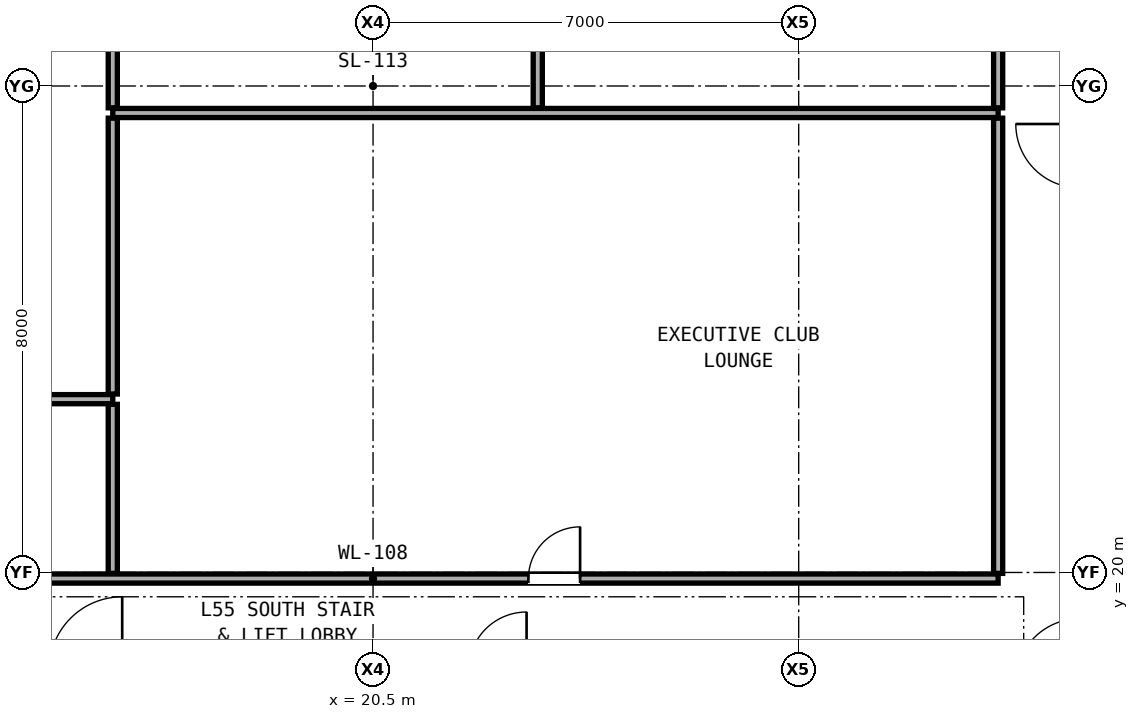
"""IFC4 building model, lengths in metres.
Left out: names, types, materials, properties, quantities, classifications, styles, units other than length and angle.
Written with IfcOpenShell. Run it as: python <this file> out.ifc"""

import sys

from ifc_helpers import new_model, si_unit, direction, frame, frame_2d, origin, place, context, subcontext, project, spatial, rectangle, extrude, element, fill, save


model = new_model("IFC4")
c1 = context("Model", 3, precision=1e-05, world=origin(), true_north=direction((0.0, 1.0)))
c2 = subcontext(c1, "Body", "Model", "MODEL_VIEW")
j1 = project(units=[si_unit("LENGTHUNIT", "METRE"), si_unit("PLANEANGLEUNIT", "RADIAN")], contexts=[c1])
p1 = place(None, origin())
s1 = spatial("IfcSite", under=j1, at=p1, CompositionType="ELEMENT")
p2 = place(p1, origin())
s2 = spatial("IfcBuilding", under=s1, at=p2, CompositionType="ELEMENT")
p3 = place(p2, frame((0.0, 0.0, 193.4)))
s3 = spatial("IfcBuildingStorey", under=s2, at=p3, CompositionType="ELEMENT", Elevation=193.4)
p4 = place(p3, frame((10.22, 19.9, 0.0), z_axis=(0.0, 0.0, 1.0), x_axis=(1.0, 0.0, 0.0)))
e1 = element("IfcWall", 1, at=p4, inside=s3, PredefinedType="PARTITIONING", context=c2, shape_type="SweptSolid", body=[
    extrude(rectangle(XDim=20.56, YDim=0.15, at=frame_2d((10.28, 0.0))), origin(), (0.0, 0.0, 1.0), 2.186),
])
p5 = place(p4, frame((1.36, 0.0, 0.0)))
e2 = element("IfcOpeningElement", 2, at=p5, cuts=e1, PredefinedType="OPENING", context=c2, shape_type="SweptSolid", body=[
    extrude(rectangle(XDim=0.9, YDim=2.1, at=frame_2d((0.45, 1.05))), frame((0.0, 0.085, 0.0), z_axis=(0.0, -1.0, 0.0), x_axis=(1.0, 0.0, 0.0)), (0.0, 0.0, 1.0), 0.17),
])
p6 = place(p4, frame((4.015, 0.0, 0.0)))
e3 = element("IfcOpeningElement", 3, at=p6, cuts=e1, PredefinedType="OPENING", context=c2, shape_type="SweptSolid", body=[
    extrude(rectangle(XDim=0.95, YDim=2.15, at=frame_2d((0.475, 1.075))), frame((0.0, 0.085, 0.0), z_axis=(0.0, -1.0, 0.0), x_axis=(1.0, 0.0, 0.0)), (0.0, 0.0, 1.0), 0.17),
])
p7 = place(p4, frame((12.835, 0.0, 0.0)))
e4 = element("IfcOpeningElement", 4, at=p7, cuts=e1, PredefinedType="OPENING", context=c2, shape_type="SweptSolid", body=[
    extrude(rectangle(XDim=0.85, YDim=2.01, at=frame_2d((0.425, 1.005))), frame((0.0, 0.085, 0.0), z_axis=(0.0, -1.0, 0.0), x_axis=(1.0, 0.0, 0.0)), (0.0, 0.0, 1.0), 0.17),
])
p8 = place(p3, frame((10.22, 22.85, 0.0), z_axis=(0.0, 0.0, 1.0), x_axis=(1.0, 0.0, 0.0)))
e5 = element("IfcWall", 5, at=p8, inside=s3, PredefinedType="PARTITIONING", context=c2, shape_type="SweptSolid", body=[
    extrude(rectangle(XDim=6.0, YDim=0.15, at=frame_2d((3.0, 0.0))), origin(), (0.0, 0.0, 1.0), 2.186),
])
p9 = place(p3, frame((16.22, 27.556, 0.0), z_axis=(0.0, 0.0, 1.0), x_axis=(1.0, 0.0, 0.0)))
e6 = element("IfcWall", 6, at=p9, inside=s3, PredefinedType="PARTITIONING", context=c2, shape_type="SweptSolid", body=[
    extrude(rectangle(XDim=14.56, YDim=0.15, at=frame_2d((7.28, 0.0))), origin(), (0.0, 0.0, 1.0), 2.186),
])
p10 = place(p3, frame((16.22, 19.985, 0.0), z_axis=(0.0, 0.0, 1.0), x_axis=(0.0, 1.0, 0.0)))
e7 = element("IfcWall", 7, at=p10, inside=s3, PredefinedType="PARTITIONING", context=c2, shape_type="SweptSolid", body=[
    extrude(rectangle(XDim=2.78, YDim=0.15, at=frame_2d((1.39, 0.0))), origin(), (0.0, 0.0, 1.0), 3.05),
])
p11 = place(p3, frame((16.22, 22.935, 0.0), z_axis=(0.0, 0.0, 1.0), x_axis=(0.0, 1.0, 0.0)))
e8 = element("IfcWall", 8, at=p11, inside=s3, PredefinedType="PARTITIONING", context=c2, shape_type="SweptSolid", body=[
    extrude(rectangle(XDim=4.536, YDim=0.15, at=frame_2d((2.268, 0.0))), origin(), (0.0, 0.0, 1.0), 2.186),
])
for number, where, z_axis, x_axis in (
    (9, (16.22, 27.641, 0.0), (0.0, 0.0, 1.0), (0.0, 1.0, 0.0)),
    (10, (23.209, 27.641, 0.0), (0.0, 0.0, 1.0), (0.0, 1.0, 0.0)),
):
    element("IfcWall", number, at=place(p3, frame(where, z_axis=z_axis, x_axis=x_axis)), inside=s3, PredefinedType="PARTITIONING", context=c2, shape_type="SweptSolid", body=[
        extrude(rectangle(XDim=5.374, YDim=0.15, at=frame_2d((2.687, 0.0))), origin(), (0.0, 0.0, 1.0), 2.186),
    ])
p12 = place(p3, frame((30.78, 19.985, 0.0), z_axis=(0.0, 0.0, 1.0), x_axis=(0.0, 1.0, 0.0)))
e11 = element("IfcWall", 11, at=p12, inside=s3, PredefinedType="PARTITIONING", context=c2, shape_type="SweptSolid", body=[
    extrude(rectangle(XDim=7.486, YDim=0.15, at=frame_2d((3.743, 0.0))), origin(), (0.0, 0.0, 1.0), 2.346),
])
p13 = place(p3, frame((30.78, 27.641, 0.0), z_axis=(0.0, 0.0, 1.0), x_axis=(0.0, 1.0, 0.0)))
e12 = element("IfcWall", 12, at=p13, inside=s3, PredefinedType="PARTITIONING", context=c2, shape_type="SweptSolid", body=[
    extrude(rectangle(XDim=5.374, YDim=0.15, at=frame_2d((2.687, 0.0))), origin(), (0.0, 0.0, 1.0), 2.346),
])
p14 = place(p7, origin())
e13 = element("IfcDoor", 13, at=p14, inside=s3, OperationType="SINGLE_SWING_RIGHT", PredefinedType="DOOR", context=c2, shape_type="SweptSolid", body=[
    extrude(rectangle(XDim=0.85, YDim=2.01, at=frame_2d((0.425, 1.005))), frame((0.0, 0.025, 0.0), z_axis=(0.0, -1.0, 0.0), x_axis=(1.0, 0.0, 0.0)), (0.0, 0.0, 1.0), 0.05),
])
fill(e4, e13)
save(model, sys.argv[1])
